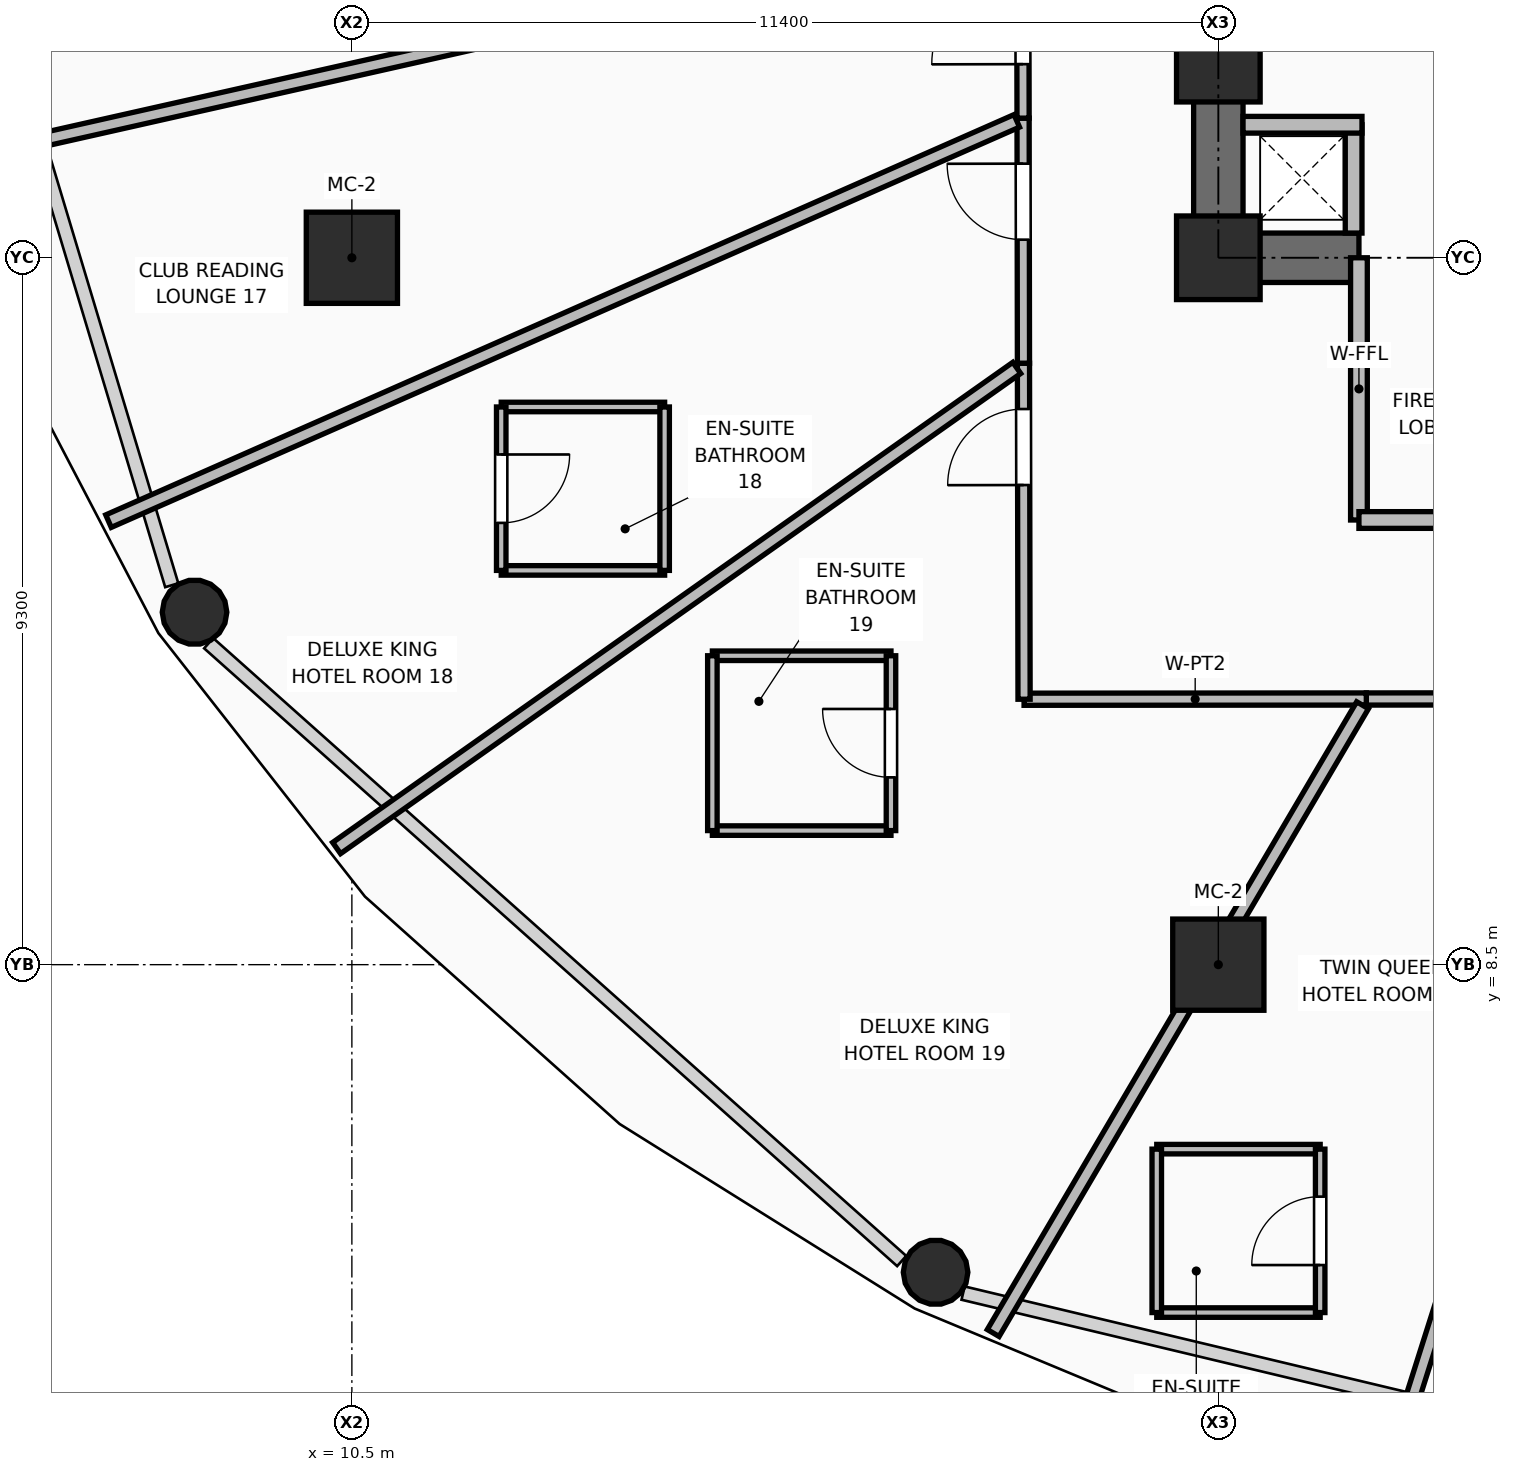
"""IFC4 building model, lengths in metres.
Left out: names, types, materials, properties, quantities, classifications, styles, units other than length and angle.
Written with IfcOpenShell. Run it as: python <this file> out.ifc"""

import sys

from ifc_helpers import new_model, si_unit, direction, frame, frame_2d, origin, origin_2d, place, context, subcontext, project, spatial, rectangle, hollow_rectangle, hollow_circle, extrude, element, fill, save


model = new_model("IFC4")
c1 = context("Model", 3, precision=1e-05, world=origin(), true_north=direction((0.0, 1.0)))
c2 = subcontext(c1, "Body", "Model", "MODEL_VIEW")
j1 = project(units=[si_unit("LENGTHUNIT", "METRE"), si_unit("PLANEANGLEUNIT", "RADIAN")], contexts=[c1])
p1 = place(None, origin())
s1 = spatial("IfcSite", under=j1, at=p1, CompositionType="ELEMENT")
p2 = place(p1, origin())
s2 = spatial("IfcBuilding", under=s1, at=p2, CompositionType="ELEMENT")
p3 = place(p2, frame((0.0, 0.0, 53.25)))
s3 = spatial("IfcBuildingStorey", under=s2, at=p3, CompositionType="ELEMENT", Elevation=53.25)
for number, where, z_axis, x_axis in (
    (1, (21.9, 17.8, 0.0), (0.0, 0.0, 1.0), (1.0, 0.0, 0.0)),
    (2, (21.9, 20.4, 0.0), (0.0, 0.0, 1.0), (1.0, 0.0, 0.0)),
):
    element("IfcColumn", number, at=place(p3, frame(where, z_axis=z_axis, x_axis=x_axis)), inside=s3, PredefinedType="COLUMN", context=c2, shape_type="SweptSolid", body=[
        extrude(rectangle(XDim=1.1, YDim=1.1, at=origin_2d()), origin(), (0.0, 0.0, 1.0), 3.75),
    ])
for number, where, z_axis, x_axis in (
    (3, (21.9, 8.5, 0.0), (0.0, 0.0, 1.0), (1.0, 0.0, 0.0)),
    (4, (10.5, 17.8, 0.0), (0.0, 0.0, 1.0), (1.0, 0.0, 0.0)),
):
    element("IfcColumn", number, at=place(p3, frame(where, z_axis=z_axis, x_axis=x_axis)), inside=s3, PredefinedType="COLUMN", context=c2, shape_type="SweptSolid", body=[
        extrude(hollow_rectangle(XDim=1.2, YDim=1.2, WallThickness=0.045, at=origin_2d()), origin(), (0.0, 0.0, 1.0), 3.75),
    ])
p4 = place(p3, frame((8.43, 13.137, 0.0), z_axis=(-0.192218909821, -0.099280833242, 0.976317165095), x_axis=(0.458902314779, -0.888486727808, 0.0)))
e5 = element("IfcColumn", 5, at=p4, inside=s3, PredefinedType="COLUMN", context=c2, shape_type="SweptSolid", body=[
    extrude(hollow_circle(Radius=0.425, WallThickness=0.04, at=origin_2d()), origin(), (0.0, 0.0, 1.0), 3.657),
])
p5 = place(p3, frame((18.18, 4.453, 0.0), z_axis=(-0.111309599924, -0.172151708361, 0.978761442985), x_axis=(0.839754063035, -0.542966954443, 0.0)))
e6 = element("IfcColumn", 6, at=p5, inside=s3, PredefinedType="COLUMN", context=c2, shape_type="SweptSolid", body=[
    extrude(hollow_circle(Radius=0.425, WallThickness=0.04, at=origin_2d()), origin(), (0.0, 0.0, 1.0), 3.647),
])
p6 = place(p3, frame((21.575, 17.8, 0.0), z_axis=(0.0, 0.0, 1.0), x_axis=(1.0, 0.0, 0.0)))
e7 = element("IfcWall", 7, at=p6, inside=s3, PredefinedType="SHEAR", context=c2, shape_type="SweptSolid", body=[
    extrude(rectangle(XDim=2.175, YDim=0.65, at=frame_2d((1.087, 0.0))), origin(), (0.0, 0.0, 1.0), 3.57),
])
p7 = place(p3, frame((21.9, 18.125, 0.0), z_axis=(0.0, 0.0, 1.0), x_axis=(0.0, 1.0, 0.0)))
e8 = element("IfcWall", 8, at=p7, inside=s3, PredefinedType="SHEAR", context=c2, shape_type="SweptSolid", body=[
    extrude(rectangle(XDim=14.0, YDim=0.65, at=frame_2d((7.0, 0.0))), origin(), (0.0, 0.0, 1.0), 3.57),
])
p8 = place(p3, frame((23.68, 18.125, 0.0), z_axis=(0.0, 0.0, 1.0), x_axis=(0.0, 1.0, 0.0)))
e9 = element("IfcWall", 9, at=p8, inside=s3, PredefinedType="PARTITIONING", context=c2, shape_type="SweptSolid", body=[
    extrude(rectangle(XDim=1.425, YDim=0.22, at=frame_2d((0.712, 0.0))), origin(), (0.0, 0.0, 1.0), 3.55),
])
p9 = place(p3, frame((22.225, 19.55, 0.0), z_axis=(0.0, 0.0, 1.0), x_axis=(1.0, 0.0, 0.0)))
e10 = element("IfcWall", 10, at=p9, inside=s3, PredefinedType="PARTITIONING", context=c2, shape_type="SweptSolid", body=[
    extrude(rectangle(XDim=1.565, YDim=0.22, at=frame_2d((0.782, 0.0))), origin(), (0.0, 0.0, 1.0), 2.595),
])
p10 = place(p3, frame((23.75, 14.35, 0.0), z_axis=(0.0, 0.0, 1.0), x_axis=(0.0, 1.0, 0.0)))
e11 = element("IfcWall", 11, at=p10, inside=s3, PredefinedType="PARTITIONING", context=c2, shape_type="SweptSolid", body=[
    extrude(rectangle(XDim=3.45, YDim=0.22, at=frame_2d((1.725, 0.0))), origin(), (0.0, 0.0, 1.0), 2.928),
])
p11 = place(p3, frame((23.75, 14.35, 0.0), z_axis=(0.0, 0.0, 1.0), x_axis=(1.0, 0.0, 0.0)))
e12 = element("IfcWall", 12, at=p11, inside=s3, PredefinedType="PARTITIONING", context=c2, shape_type="SweptSolid", body=[
    extrude(rectangle(XDim=3.8, YDim=0.22, at=frame_2d((1.9, 0.0))), origin(), (0.0, 0.0, 1.0), 3.55),
])
p12 = place(p3, frame((27.374, 11.998, 0.0), z_axis=(0.0, 0.0, 1.0), x_axis=(-0.999999655033, -0.000830621988, 0.0)))
e13 = element("IfcWall", 13, at=p12, inside=s3, PredefinedType="PARTITIONING", context=c2, shape_type="SweptSolid", body=[
    extrude(rectangle(XDim=3.527, YDim=0.16, at=frame_2d((1.764, 0.0))), origin(), (0.0, 0.0, 1.0), 3.55),
])
p13 = place(p12, frame((1.337, 0.0, 0.0)))
e14 = element("IfcOpeningElement", 14, at=p13, cuts=e13, PredefinedType="OPENING", context=c2, shape_type="SweptSolid", body=[
    extrude(rectangle(XDim=1.0, YDim=2.1, at=frame_2d((0.5, 1.05))), frame((0.0, 0.09, 0.0), z_axis=(0.0, -1.0, 0.0), x_axis=(1.0, 0.0, 0.0)), (0.0, 0.0, 1.0), 0.18),
])
p14 = place(p3, frame((23.847, 11.995, 0.0), z_axis=(0.0, 0.0, 1.0), x_axis=(-0.999999751603, -0.000704836086, 0.0)))
e15 = element("IfcWall", 15, at=p14, inside=s3, PredefinedType="PARTITIONING", context=c2, shape_type="SweptSolid", body=[
    extrude(rectangle(XDim=4.503, YDim=0.16, at=frame_2d((2.251, 0.0))), origin(), (0.0, 0.0, 1.0), 2.928),
])
p15 = place(p3, frame((19.344, 11.992, 0.0), z_axis=(0.0, 0.0, 1.0), x_axis=(-0.001822295279, 0.999998339619, 0.0)))
e16 = element("IfcWall", 16, at=p15, inside=s3, PredefinedType="PARTITIONING", context=c2, shape_type="SweptSolid", body=[
    extrude(rectangle(XDim=4.421, YDim=0.16, at=frame_2d((2.21, 0.0))), origin(), (0.0, 0.0, 1.0), 3.55),
])
p16 = place(p15, frame((2.818, 0.0, 0.0)))
e17 = element("IfcOpeningElement", 17, at=p16, cuts=e16, PredefinedType="OPENING", context=c2, shape_type="SweptSolid", body=[
    extrude(rectangle(XDim=1.0, YDim=2.1, at=frame_2d((0.5, 1.05))), frame((0.0, 0.09, 0.0), z_axis=(0.0, -1.0, 0.0), x_axis=(1.0, 0.0, 0.0)), (0.0, 0.0, 1.0), 0.18),
])
p17 = place(p3, frame((19.336, 16.413, 0.0), z_axis=(0.0, 0.0, 1.0), x_axis=(-0.001514576074, 0.999998853029, 0.0)))
e18 = element("IfcWall", 18, at=p17, inside=s3, PredefinedType="PARTITIONING", context=c2, shape_type="SweptSolid", body=[
    extrude(rectangle(XDim=3.224, YDim=0.16, at=frame_2d((1.612, 0.0))), origin(), (0.0, 0.0, 1.0), 2.928),
])
p18 = place(p17, frame((1.625, 0.0, 0.0)))
e19 = element("IfcOpeningElement", 19, at=p18, cuts=e18, PredefinedType="OPENING", context=c2, shape_type="SweptSolid", body=[
    extrude(rectangle(XDim=1.0, YDim=2.1, at=frame_2d((0.5, 1.05))), frame((0.0, 0.09, 0.0), z_axis=(0.0, -1.0, 0.0), x_axis=(1.0, 0.0, 0.0)), (0.0, 0.0, 1.0), 0.18),
])
p19 = place(p3, frame((19.331, 19.637, 0.0), z_axis=(0.0, 0.0, 1.0), x_axis=(-0.001956761069, 0.999998085541, 0.0)))
e20 = element("IfcWall", 20, at=p19, inside=s3, PredefinedType="PARTITIONING", context=c2, shape_type="SweptSolid", body=[
    extrude(rectangle(XDim=2.62, YDim=0.16, at=frame_2d((1.31, 0.0))), origin(), (0.0, 0.0, 1.0), 2.928),
])
p20 = place(p19, frame((0.71, 0.0, 0.0)))
e21 = element("IfcOpeningElement", 21, at=p20, cuts=e20, PredefinedType="OPENING", context=c2, shape_type="SweptSolid", body=[
    extrude(rectangle(XDim=1.2, YDim=2.1, at=frame_2d((0.6, 1.05))), frame((0.0, 0.09, 0.0), z_axis=(0.0, -1.0, 0.0), x_axis=(1.0, 0.0, 0.0)), (0.0, 0.0, 1.0), 0.18),
])
p21 = place(p3, frame((19.248, 22.24, 0.0), z_axis=(0.0, 0.0, 1.0), x_axis=(-0.975547769482, -0.219787509789, 0.0)))
e22 = element("IfcWall", 22, at=p21, inside=s3, PredefinedType="PARTITIONING", context=c2, shape_type="SweptSolid", body=[
    extrude(rectangle(XDim=14.264, YDim=0.18, at=frame_2d((7.132, 0.0))), origin(), (0.0, 0.0, 1.0), 2.775),
])
p22 = place(p3, frame((19.248, 19.601, 0.0), z_axis=(0.0, 0.0, 1.0), x_axis=(-0.915085250617, -0.403260442025, 0.0)))
e23 = element("IfcWall", 23, at=p22, inside=s3, PredefinedType="PARTITIONING", context=c2, shape_type="SweptSolid", body=[
    extrude(rectangle(XDim=13.059, YDim=0.18, at=frame_2d((6.529, 0.0))), origin(), (0.0, 0.0, 1.0), 2.775),
])
p23 = place(p3, frame((19.248, 16.351, 0.0), z_axis=(0.0, 0.0, 1.0), x_axis=(-0.816958598031, -0.576696323123, 0.0)))
e24 = element("IfcWall", 24, at=p23, inside=s3, PredefinedType="PARTITIONING", context=c2, shape_type="SweptSolid", body=[
    extrude(rectangle(XDim=10.954, YDim=0.18, at=frame_2d((5.477, 0.0))), origin(), (0.0, 0.0, 1.0), 2.775),
])
p24 = place(p3, frame((23.798, 11.913, 0.0), z_axis=(0.0, 0.0, 1.0), x_axis=(-0.507163744978, -0.86184971763, 0.0)))
e25 = element("IfcWall", 25, at=p24, inside=s3, PredefinedType="PARTITIONING", context=c2, shape_type="SweptSolid", body=[
    extrude(rectangle(XDim=9.583, YDim=0.18, at=frame_2d((4.792, 0.0))), origin(), (0.0, 0.0, 1.0), 2.775),
])
p25 = place(p3, frame((27.346, 11.913, 0.0), z_axis=(0.0, 0.0, 1.0), x_axis=(-0.30246369842, -0.953160905166, 0.0)))
e26 = element("IfcWall", 26, at=p25, inside=s3, PredefinedType="PARTITIONING", context=c2, shape_type="SweptSolid", body=[
    extrude(rectangle(XDim=10.583, YDim=0.18, at=frame_2d((5.292, 0.0))), origin(), (0.0, 0.0, 1.0), 2.775),
])
for number, where, z_axis, x_axis in (
    (27, (12.465, 13.687, 0.0), (0.0, 0.0, 1.0), (1.0, 0.0, 0.0)),
    (28, (12.465, 15.837, 0.0), (0.0, 0.0, 1.0), (1.0, 0.0, 0.0)),
):
    element("IfcWall", number, at=place(p3, frame(where, z_axis=z_axis, x_axis=x_axis)), inside=s3, PredefinedType="PARTITIONING", context=c2, shape_type="SweptSolid", body=[
        extrude(rectangle(XDim=2.15, YDim=0.125, at=frame_2d((1.075, 0.0))), origin(), (0.0, 0.0, 1.0), 3.55),
    ])
p26 = place(p3, frame((12.465, 13.687, 0.0), z_axis=(0.0, 0.0, 1.0), x_axis=(0.0, 1.0, 0.0)))
e29 = element("IfcWall", 29, at=p26, inside=s3, PredefinedType="PARTITIONING", context=c2, shape_type="SweptSolid", body=[
    extrude(rectangle(XDim=2.15, YDim=0.125, at=frame_2d((1.075, 0.0))), origin(), (0.0, 0.0, 1.0), 2.928),
])
p27 = place(p26, frame((0.625, 0.0, 0.0)))
e30 = element("IfcOpeningElement", 30, at=p27, cuts=e29, PredefinedType="OPENING", context=c2, shape_type="SweptSolid", body=[
    extrude(rectangle(XDim=0.9, YDim=2.1, at=frame_2d((0.45, 1.05))), frame((0.0, 0.073, 0.0), z_axis=(0.0, -1.0, 0.0), x_axis=(1.0, 0.0, 0.0)), (0.0, 0.0, 1.0), 0.145),
])
p28 = place(p3, frame((14.615, 13.687, 0.0), z_axis=(0.0, 0.0, 1.0), x_axis=(0.0, 1.0, 0.0)))
e31 = element("IfcWall", 31, at=p28, inside=s3, PredefinedType="PARTITIONING", context=c2, shape_type="SweptSolid", body=[
    extrude(rectangle(XDim=2.15, YDim=0.125, at=frame_2d((1.075, 0.0))), origin(), (0.0, 0.0, 1.0), 2.928),
])
for number, where, z_axis, x_axis in (
    (32, (15.243, 10.264, 0.0), (0.0, 0.0, 1.0), (1.0, 0.0, 0.0)),
    (33, (15.243, 12.564, 0.0), (0.0, 0.0, 1.0), (1.0, 0.0, 0.0)),
):
    element("IfcWall", number, at=place(p3, frame(where, z_axis=z_axis, x_axis=x_axis)), inside=s3, PredefinedType="PARTITIONING", context=c2, shape_type="SweptSolid", body=[
        extrude(rectangle(XDim=2.35, YDim=0.125, at=frame_2d((1.175, 0.0))), origin(), (0.0, 0.0, 1.0), 3.55),
    ])
p29 = place(p3, frame((15.243, 10.264, 0.0), z_axis=(0.0, 0.0, 1.0), x_axis=(0.0, 1.0, 0.0)))
e34 = element("IfcWall", 34, at=p29, inside=s3, PredefinedType="PARTITIONING", context=c2, shape_type="SweptSolid", body=[
    extrude(rectangle(XDim=2.3, YDim=0.125, at=frame_2d((1.15, 0.0))), origin(), (0.0, 0.0, 1.0), 3.55),
])
p30 = place(p3, frame((17.593, 10.264, 0.0), z_axis=(0.0, 0.0, 1.0), x_axis=(0.0, 1.0, 0.0)))
e35 = element("IfcWall", 35, at=p30, inside=s3, PredefinedType="PARTITIONING", context=c2, shape_type="SweptSolid", body=[
    extrude(rectangle(XDim=2.3, YDim=0.125, at=frame_2d((1.15, 0.0))), origin(), (0.0, 0.0, 1.0), 3.55),
])
p31 = place(p30, frame((0.7, 0.0, 0.0)))
e36 = element("IfcOpeningElement", 36, at=p31, cuts=e35, PredefinedType="OPENING", context=c2, shape_type="SweptSolid", body=[
    extrude(rectangle(XDim=0.9, YDim=2.1, at=frame_2d((0.45, 1.05))), frame((0.0, 0.073, 0.0), z_axis=(0.0, -1.0, 0.0), x_axis=(1.0, 0.0, 0.0)), (0.0, 0.0, 1.0), 0.145),
])
for number, where, z_axis, x_axis in (
    (37, (21.09, 3.923, 0.0), (0.0, 0.0, 1.0), (1.0, 0.0, 0.0)),
    (38, (21.09, 6.073, 0.0), (0.0, 0.0, 1.0), (1.0, 0.0, 0.0)),
    (39, (21.09, 3.923, 0.0), (0.0, 0.0, 1.0), (0.0, 1.0, 0.0)),
):
    element("IfcWall", number, at=place(p3, frame(where, z_axis=z_axis, x_axis=x_axis)), inside=s3, PredefinedType="PARTITIONING", context=c2, shape_type="SweptSolid", body=[
        extrude(rectangle(XDim=2.15, YDim=0.125, at=frame_2d((1.075, 0.0))), origin(), (0.0, 0.0, 1.0), 3.55),
    ])
p32 = place(p3, frame((23.24, 3.923, 0.0), z_axis=(0.0, 0.0, 1.0), x_axis=(0.0, 1.0, 0.0)))
e40 = element("IfcWall", 40, at=p32, inside=s3, PredefinedType="PARTITIONING", context=c2, shape_type="SweptSolid", body=[
    extrude(rectangle(XDim=2.15, YDim=0.125, at=frame_2d((1.075, 0.0))), origin(), (0.0, 0.0, 1.0), 3.55),
])
p33 = place(p32, frame((0.625, 0.0, 0.0)))
e41 = element("IfcOpeningElement", 41, at=p33, cuts=e40, PredefinedType="OPENING", context=c2, shape_type="SweptSolid", body=[
    extrude(rectangle(XDim=0.9, YDim=2.1, at=frame_2d((0.45, 1.05))), frame((0.0, 0.073, 0.0), z_axis=(0.0, -1.0, 0.0), x_axis=(1.0, 0.0, 0.0)), (0.0, 0.0, 1.0), 0.145),
])
p34 = place(p20, origin())
e42 = element("IfcDoor", 42, at=p34, inside=s3, OperationType="SINGLE_SWING_LEFT", PredefinedType="DOOR", context=c2, shape_type="SweptSolid", body=[
    extrude(rectangle(XDim=1.2, YDim=2.1, at=frame_2d((0.6, 1.05))), frame((0.0, 0.025, 0.0), z_axis=(0.0, -1.0, 0.0), x_axis=(1.0, 0.0, 0.0)), (0.0, 0.0, 1.0), 0.05),
])
fill(e21, e42)
p35 = place(p27, frame((0.9, 0.0, 0.0), z_axis=(0.0, 0.0, 1.0), x_axis=(-1.0, 0.0, 0.0)))
e43 = element("IfcDoor", 43, at=p35, inside=s3, OperationType="SINGLE_SWING_LEFT", PredefinedType="DOOR", context=c2, shape_type="SweptSolid", body=[
    extrude(rectangle(XDim=0.9, YDim=2.1, at=frame_2d((0.45, 1.05))), frame((0.0, 0.025, 0.0), z_axis=(0.0, -1.0, 0.0), x_axis=(1.0, 0.0, 0.0)), (0.0, 0.0, 1.0), 0.05),
])
fill(e30, e43)
p36 = place(p18, origin())
e44 = element("IfcDoor", 44, at=p36, inside=s3, OperationType="SINGLE_SWING_RIGHT", PredefinedType="DOOR", context=c2, shape_type="SweptSolid", body=[
    extrude(rectangle(XDim=1.0, YDim=2.1, at=frame_2d((0.5, 1.05))), frame((0.0, 0.025, 0.0), z_axis=(0.0, -1.0, 0.0), x_axis=(1.0, 0.0, 0.0)), (0.0, 0.0, 1.0), 0.05),
])
fill(e19, e44)
p37 = place(p31, origin())
e45 = element("IfcDoor", 45, at=p37, inside=s3, OperationType="SINGLE_SWING_RIGHT", PredefinedType="DOOR", context=c2, shape_type="SweptSolid", body=[
    extrude(rectangle(XDim=0.9, YDim=2.1, at=frame_2d((0.45, 1.05))), frame((0.0, 0.025, 0.0), z_axis=(0.0, -1.0, 0.0), x_axis=(1.0, 0.0, 0.0)), (0.0, 0.0, 1.0), 0.05),
])
fill(e36, e45)
p38 = place(p16, origin())
e46 = element("IfcDoor", 46, at=p38, inside=s3, OperationType="SINGLE_SWING_LEFT", PredefinedType="DOOR", context=c2, shape_type="SweptSolid", body=[
    extrude(rectangle(XDim=1.0, YDim=2.1, at=frame_2d((0.5, 1.05))), frame((0.0, 0.025, 0.0), z_axis=(0.0, -1.0, 0.0), x_axis=(1.0, 0.0, 0.0)), (0.0, 0.0, 1.0), 0.05),
])
fill(e17, e46)
p39 = place(p33, origin())
e47 = element("IfcDoor", 47, at=p39, inside=s3, OperationType="SINGLE_SWING_LEFT", PredefinedType="DOOR", context=c2, shape_type="SweptSolid", body=[
    extrude(rectangle(XDim=0.9, YDim=2.1, at=frame_2d((0.45, 1.05))), frame((0.0, 0.025, 0.0), z_axis=(0.0, -1.0, 0.0), x_axis=(1.0, 0.0, 0.0)), (0.0, 0.0, 1.0), 0.05),
])
fill(e41, e47)
save(model, sys.argv[1])
